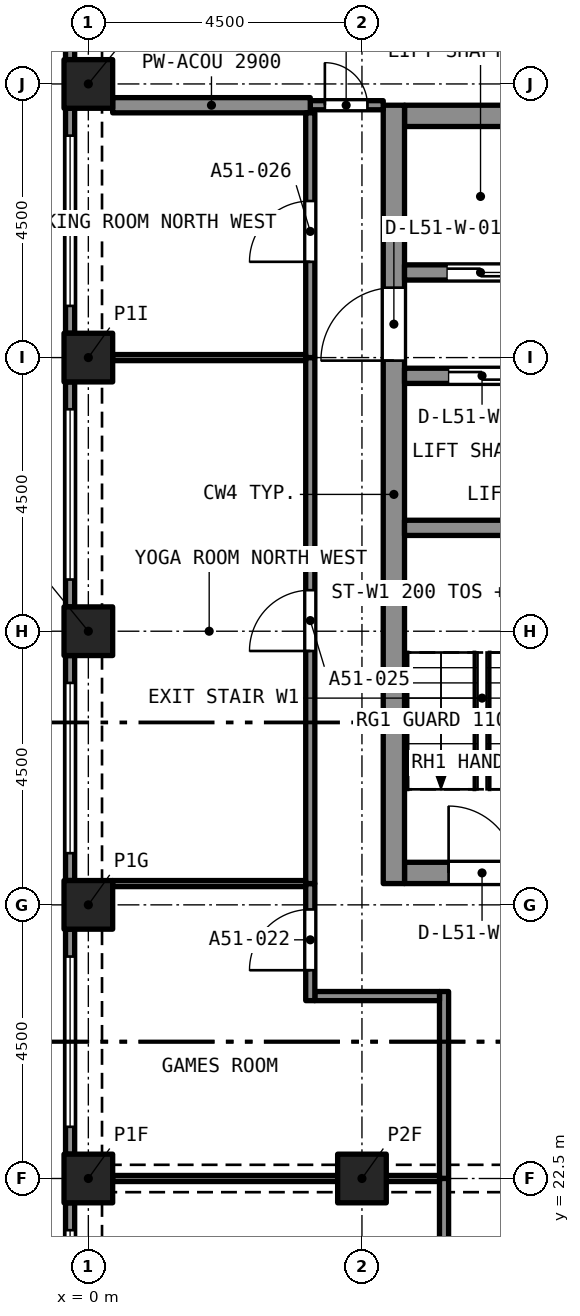
"""IFC4 building model, lengths in metres.
Left out: names, types, materials, properties, quantities, classifications, styles, units other than length and angle.
Written with IfcOpenShell. Run it as: python <this file> out.ifc"""

import sys

from ifc_helpers import new_model, si_unit, direction, frame, frame_2d, origin, origin_2d, place, context, subcontext, project, spatial, rectangle, extrude, element, fill, save


model = new_model("IFC4")
c1 = context("Model", 3, precision=1e-05, world=origin(), true_north=direction((0.0, 1.0)))
c2 = subcontext(c1, "Body", "Model", "MODEL_VIEW")
j1 = project(units=[si_unit("LENGTHUNIT", "METRE"), si_unit("PLANEANGLEUNIT", "RADIAN")], contexts=[c1])
p1 = place(None, origin())
s1 = spatial("IfcSite", under=j1, at=p1, CompositionType="ELEMENT")
p2 = place(p1, origin())
s2 = spatial("IfcBuilding", under=s1, at=p2, CompositionType="ELEMENT")
p3 = place(p2, frame((0.0, 0.0, 185.9)))
s3 = spatial("IfcBuildingStorey", under=s2, at=p3, CompositionType="ELEMENT", Elevation=185.9)
for number, where, z_axis, x_axis in (
    (1, (0.0, 22.5, 0.0), (0.0, 0.0, 1.0), (1.0, 0.0, 0.0)),
    (2, (4.5, 22.5, 0.0), (0.0, 0.0, 1.0), (1.0, 0.0, 0.0)),
    (3, (0.0, 27.0, 0.0), (0.0, 0.0, 1.0), (1.0, 0.0, 0.0)),
    (4, (0.0, 31.5, 0.0), (0.0, 0.0, 1.0), (1.0, 0.0, 0.0)),
    (5, (0.0, 36.0, 0.0), (0.0, 0.0, 1.0), (1.0, 0.0, 0.0)),
    (6, (0.0, 40.5, 0.0), (0.0, 0.0, 1.0), (1.0, 0.0, 0.0)),
):
    element("IfcColumn", number, at=place(p3, frame(where, z_axis=z_axis, x_axis=x_axis)), inside=s3, PredefinedType="COLUMN", context=c2, shape_type="SweptSolid", body=[
        extrude(rectangle(XDim=0.8, YDim=0.8, at=origin_2d()), origin(), (0.0, 0.0, 1.0), 3.2),
    ])
p4 = place(p3, frame((5.2, 27.525, 0.0), z_axis=(0.0, 0.0, 1.0), x_axis=(1.0, 0.0, 0.0)))
e7 = element("IfcWall", 7, at=p4, inside=s3, PredefinedType="SOLIDWALL", context=c2, shape_type="SweptSolid", body=[
    extrude(rectangle(XDim=7.6, YDim=0.35, at=frame_2d((3.8, 0.0))), origin(), (0.0, 0.0, 1.0), 3.2),
])
p5 = place(p4, frame((0.725, 0.0, 0.0)))
e8 = element("IfcOpeningElement", 8, at=p5, cuts=e7, PredefinedType="OPENING", context=c2, shape_type="SweptSolid", body=[
    extrude(rectangle(XDim=1.1, YDim=2.1, at=frame_2d((0.55, 1.05))), frame((0.0, 0.185, 0.0), z_axis=(0.0, -1.0, 0.0), x_axis=(1.0, 0.0, 0.0)), (0.0, 0.0, 1.0), 0.37),
])
p6 = place(p4, frame((3.25, 0.0, 0.0)))
e9 = element("IfcOpeningElement", 9, at=p6, cuts=e7, PredefinedType="OPENING", context=c2, shape_type="SweptSolid", body=[
    extrude(rectangle(XDim=1.1, YDim=2.1, at=frame_2d((0.55, 1.05))), frame((0.0, 0.185, 0.0), z_axis=(0.0, -1.0, 0.0), x_axis=(1.0, 0.0, 0.0)), (0.0, 0.0, 1.0), 0.37),
])
p7 = place(p4, frame((5.775, 0.0, 0.0)))
e10 = element("IfcOpeningElement", 10, at=p7, cuts=e7, PredefinedType="OPENING", context=c2, shape_type="SweptSolid", body=[
    extrude(rectangle(XDim=1.1, YDim=2.1, at=frame_2d((0.55, 1.05))), frame((0.0, 0.185, 0.0), z_axis=(0.0, -1.0, 0.0), x_axis=(1.0, 0.0, 0.0)), (0.0, 0.0, 1.0), 0.37),
])
p8 = place(p3, frame((5.2, 39.975, 0.0), z_axis=(0.0, 0.0, 1.0), x_axis=(1.0, 0.0, 0.0)))
e11 = element("IfcWall", 11, at=p8, inside=s3, PredefinedType="SOLIDWALL", context=c2, shape_type="SweptSolid", body=[
    extrude(rectangle(XDim=7.6, YDim=0.35, at=frame_2d((3.8, 0.0))), origin(), (0.0, 0.0, 1.0), 3.2),
])
p9 = place(p3, frame((5.025, 27.35, 0.0), z_axis=(0.0, 0.0, 1.0), x_axis=(0.0, 1.0, 0.0)))
e12 = element("IfcWall", 12, at=p9, inside=s3, PredefinedType="SOLIDWALL", context=c2, shape_type="SweptSolid", body=[
    extrude(rectangle(XDim=12.8, YDim=0.35, at=frame_2d((6.4, 0.0))), origin(), (0.0, 0.0, 1.0), 3.2),
])
p10 = place(p9, frame((8.6, 0.0, 0.0)))
e13 = element("IfcOpeningElement", 13, at=p10, cuts=e12, PredefinedType="OPENING", context=c2, shape_type="SweptSolid", body=[
    extrude(rectangle(XDim=1.2, YDim=2.1, at=frame_2d((0.6, 1.05))), frame((0.0, 0.185, 0.0), z_axis=(0.0, -1.0, 0.0), x_axis=(1.0, 0.0, 0.0)), (0.0, 0.0, 1.0), 0.37),
])
p11 = place(p3, frame((-0.3, 40.9, 0.0), z_axis=(0.0, 0.0, 1.0), x_axis=(0.0, 1.0, 0.0)))
e14 = element("IfcWall", 14, at=p11, inside=s3, PredefinedType="SOLIDWALL", context=c2, shape_type="SweptSolid", body=[
    extrude(rectangle(XDim=3.7, YDim=0.15, at=frame_2d((1.85, 0.0))), origin(), (0.0, 0.0, 1.0), 3.2),
])
p12 = place(p11, frame((0.45, 0.0, 0.45)))
e15 = element("IfcOpeningElement", 15, at=p12, cuts=e14, PredefinedType="OPENING", context=c2, shape_type="SweptSolid", body=[
    extrude(rectangle(XDim=2.8, YDim=1.95, at=frame_2d((1.4, 0.975))), frame((0.0, 0.085, 0.0), z_axis=(0.0, -1.0, 0.0), x_axis=(1.0, 0.0, 0.0)), (0.0, 0.0, 1.0), 0.17),
])
p13 = place(p3, frame((-0.3, 36.4, 0.0), z_axis=(0.0, 0.0, 1.0), x_axis=(0.0, 1.0, 0.0)))
e16 = element("IfcWall", 16, at=p13, inside=s3, PredefinedType="SOLIDWALL", context=c2, shape_type="SweptSolid", body=[
    extrude(rectangle(XDim=3.7, YDim=0.15, at=frame_2d((1.85, 0.0))), origin(), (0.0, 0.0, 1.0), 3.2),
])
p14 = place(p13, frame((0.45, 0.0, 0.45)))
e17 = element("IfcOpeningElement", 17, at=p14, cuts=e16, PredefinedType="OPENING", context=c2, shape_type="SweptSolid", body=[
    extrude(rectangle(XDim=2.8, YDim=1.95, at=frame_2d((1.4, 0.975))), frame((0.0, 0.085, 0.0), z_axis=(0.0, -1.0, 0.0), x_axis=(1.0, 0.0, 0.0)), (0.0, 0.0, 1.0), 0.17),
])
p15 = place(p3, frame((-0.3, 31.9, 0.0), z_axis=(0.0, 0.0, 1.0), x_axis=(0.0, 1.0, 0.0)))
e18 = element("IfcWall", 18, at=p15, inside=s3, PredefinedType="SOLIDWALL", context=c2, shape_type="SweptSolid", body=[
    extrude(rectangle(XDim=3.7, YDim=0.15, at=frame_2d((1.85, 0.0))), origin(), (0.0, 0.0, 1.0), 3.2),
])
p16 = place(p15, frame((0.45, 0.0, 0.45)))
e19 = element("IfcOpeningElement", 19, at=p16, cuts=e18, PredefinedType="OPENING", context=c2, shape_type="SweptSolid", body=[
    extrude(rectangle(XDim=2.8, YDim=1.95, at=frame_2d((1.4, 0.975))), frame((0.0, 0.085, 0.0), z_axis=(0.0, -1.0, 0.0), x_axis=(1.0, 0.0, 0.0)), (0.0, 0.0, 1.0), 0.17),
])
p17 = place(p3, frame((-0.3, 27.4, 0.0), z_axis=(0.0, 0.0, 1.0), x_axis=(0.0, 1.0, 0.0)))
e20 = element("IfcWall", 20, at=p17, inside=s3, PredefinedType="SOLIDWALL", context=c2, shape_type="SweptSolid", body=[
    extrude(rectangle(XDim=3.7, YDim=0.15, at=frame_2d((1.85, 0.0))), origin(), (0.0, 0.0, 1.0), 3.2),
])
p18 = place(p17, frame((0.45, 0.0, 0.45)))
e21 = element("IfcOpeningElement", 21, at=p18, cuts=e20, PredefinedType="OPENING", context=c2, shape_type="SweptSolid", body=[
    extrude(rectangle(XDim=2.8, YDim=1.95, at=frame_2d((1.4, 0.975))), frame((0.0, 0.085, 0.0), z_axis=(0.0, -1.0, 0.0), x_axis=(1.0, 0.0, 0.0)), (0.0, 0.0, 1.0), 0.17),
])
p19 = place(p3, frame((-0.3, 22.9, 0.0), z_axis=(0.0, 0.0, 1.0), x_axis=(0.0, 1.0, 0.0)))
e22 = element("IfcWall", 22, at=p19, inside=s3, PredefinedType="SOLIDWALL", context=c2, shape_type="SweptSolid", body=[
    extrude(rectangle(XDim=3.7, YDim=0.15, at=frame_2d((1.85, 0.0))), origin(), (0.0, 0.0, 1.0), 3.2),
])
p20 = place(p19, frame((0.45, 0.0, 0.45)))
e23 = element("IfcOpeningElement", 23, at=p20, cuts=e22, PredefinedType="OPENING", context=c2, shape_type="SweptSolid", body=[
    extrude(rectangle(XDim=2.8, YDim=1.95, at=frame_2d((1.4, 0.975))), frame((0.0, 0.085, 0.0), z_axis=(0.0, -1.0, 0.0), x_axis=(1.0, 0.0, 0.0)), (0.0, 0.0, 1.0), 0.17),
])
p21 = place(p3, frame((-0.3, 18.4, 0.0), z_axis=(0.0, 0.0, 1.0), x_axis=(0.0, 1.0, 0.0)))
e24 = element("IfcWall", 24, at=p21, inside=s3, PredefinedType="SOLIDWALL", context=c2, shape_type="SweptSolid", body=[
    extrude(rectangle(XDim=3.7, YDim=0.15, at=frame_2d((1.85, 0.0))), origin(), (0.0, 0.0, 1.0), 3.2),
])
p22 = place(p21, frame((0.45, 0.0, 0.45)))
e25 = element("IfcOpeningElement", 25, at=p22, cuts=e24, PredefinedType="OPENING", context=c2, shape_type="SweptSolid", body=[
    extrude(rectangle(XDim=2.8, YDim=1.95, at=frame_2d((1.4, 0.975))), frame((0.0, 0.085, 0.0), z_axis=(0.0, -1.0, 0.0), x_axis=(1.0, 0.0, 0.0)), (0.0, 0.0, 1.0), 0.17),
])
p23 = place(p3, frame((3.65, 40.15, 0.0), z_axis=(0.0, 0.0, 1.0), x_axis=(1.0, 0.0, 0.0)))
e26 = element("IfcWall", 26, at=p23, inside=s3, PredefinedType="PARTITIONING", context=c2, shape_type="SweptSolid", body=[
    extrude(rectangle(XDim=1.2, YDim=0.15, at=frame_2d((0.6, 0.0))), origin(), (0.0, 0.0, 1.0), 2.9),
])
p24 = place(p23, frame((0.24, 0.0, 0.0)))
e27 = element("IfcOpeningElement", 27, at=p24, cuts=e26, PredefinedType="OPENING", context=c2, shape_type="SweptSolid", body=[
    extrude(rectangle(XDim=0.7, YDim=2.1, at=frame_2d((0.35, 1.05))), frame((0.0, 0.085, 0.0), z_axis=(0.0, -1.0, 0.0), x_axis=(1.0, 0.0, 0.0)), (0.0, 0.0, 1.0), 0.17),
])
p25 = place(p3, frame((0.4, 40.15, 0.0), z_axis=(0.0, 0.0, 1.0), x_axis=(1.0, 0.0, 0.0)))
e28 = element("IfcWall", 28, at=p25, inside=s3, PredefinedType="PARTITIONING", context=c2, shape_type="SweptSolid", body=[
    extrude(rectangle(XDim=3.25, YDim=0.25, at=frame_2d((1.625, 0.0))), origin(), (0.0, 0.0, 1.0), 2.9),
])
p26 = place(p3, frame((5.85, 22.5, 0.0), z_axis=(0.0, 0.0, 1.0), x_axis=(0.0, 1.0, 0.0)))
e29 = element("IfcWall", 29, at=p26, inside=s3, PredefinedType="PARTITIONING", context=c2, shape_type="SweptSolid", body=[
    extrude(rectangle(XDim=3.075, YDim=0.15, at=frame_2d((1.538, 0.0))), origin(), (0.0, 0.0, 1.0), 2.9),
])
p27 = place(p3, frame((3.725, 25.5, 0.0), z_axis=(0.0, 0.0, 1.0), x_axis=(1.0, 0.0, 0.0)))
e30 = element("IfcWall", 30, at=p27, inside=s3, PredefinedType="PARTITIONING", context=c2, shape_type="SweptSolid", body=[
    extrude(rectangle(XDim=2.05, YDim=0.15, at=frame_2d((1.025, 0.0))), origin(), (0.0, 0.0, 1.0), 2.9),
])
p28 = place(p3, frame((3.65, 25.425, 0.0), z_axis=(0.0, 0.0, 1.0), x_axis=(0.0, 1.0, 0.0)))
e31 = element("IfcWall", 31, at=p28, inside=s3, PredefinedType="PARTITIONING", context=c2, shape_type="SweptSolid", body=[
    extrude(rectangle(XDim=1.925, YDim=0.15, at=frame_2d((0.962, 0.0))), origin(), (0.0, 0.0, 1.0), 2.9),
])
p29 = place(p28, frame((0.5, 0.0, 0.0)))
e32 = element("IfcOpeningElement", 32, at=p29, cuts=e31, PredefinedType="OPENING", context=c2, shape_type="SweptSolid", body=[
    extrude(rectangle(XDim=1.0, YDim=2.1, at=frame_2d((0.5, 1.05))), frame((0.0, 0.085, 0.0), z_axis=(0.0, -1.0, 0.0), x_axis=(1.0, 0.0, 0.0)), (0.0, 0.0, 1.0), 0.17),
])
p30 = place(p3, frame((3.65, 27.35, 0.0), z_axis=(0.0, 0.0, 1.0), x_axis=(0.0, 1.0, 0.0)))
e33 = element("IfcWall", 33, at=p30, inside=s3, PredefinedType="PARTITIONING", context=c2, shape_type="SweptSolid", body=[
    extrude(rectangle(XDim=8.65, YDim=0.15, at=frame_2d((4.325, 0.0))), origin(), (0.0, 0.0, 1.0), 2.9),
])
p31 = place(p30, frame((3.825, 0.0, 0.0)))
e34 = element("IfcOpeningElement", 34, at=p31, cuts=e33, PredefinedType="OPENING", context=c2, shape_type="SweptSolid", body=[
    extrude(rectangle(XDim=1.0, YDim=2.1, at=frame_2d((0.5, 1.05))), frame((0.0, 0.085, 0.0), z_axis=(0.0, -1.0, 0.0), x_axis=(1.0, 0.0, 0.0)), (0.0, 0.0, 1.0), 0.17),
])
p32 = place(p3, frame((3.65, 36.0, 0.0), z_axis=(0.0, 0.0, 1.0), x_axis=(0.0, 1.0, 0.0)))
e35 = element("IfcWall", 35, at=p32, inside=s3, PredefinedType="PARTITIONING", context=c2, shape_type="SweptSolid", body=[
    extrude(rectangle(XDim=4.025, YDim=0.15, at=frame_2d((2.012, 0.0))), origin(), (0.0, 0.0, 1.0), 2.9),
])
p33 = place(p32, frame((1.575, 0.0, 0.0)))
e36 = element("IfcOpeningElement", 36, at=p33, cuts=e35, PredefinedType="OPENING", context=c2, shape_type="SweptSolid", body=[
    extrude(rectangle(XDim=1.0, YDim=2.1, at=frame_2d((0.5, 1.05))), frame((0.0, 0.085, 0.0), z_axis=(0.0, -1.0, 0.0), x_axis=(1.0, 0.0, 0.0)), (0.0, 0.0, 1.0), 0.17),
])
p34 = place(p3, frame((5.85, 13.025, 0.0), z_axis=(0.0, 0.0, 1.0), x_axis=(0.0, 1.0, 0.0)))
e37 = element("IfcWall", 37, at=p34, inside=s3, PredefinedType="PARTITIONING", context=c2, shape_type="SweptSolid", body=[
    extrude(rectangle(XDim=9.475, YDim=0.15, at=frame_2d((4.738, 0.0))), origin(), (0.0, 0.0, 1.0), 2.9),
])
p35 = place(p34, frame((4.275, 0.0, 0.0)))
e38 = element("IfcOpeningElement", 38, at=p35, cuts=e37, PredefinedType="OPENING", context=c2, shape_type="SweptSolid", body=[
    extrude(rectangle(XDim=1.0, YDim=2.1, at=frame_2d((0.5, 1.05))), frame((0.0, 0.085, 0.0), z_axis=(0.0, -1.0, 0.0), x_axis=(1.0, 0.0, 0.0)), (0.0, 0.0, 1.0), 0.17),
])
p36 = place(p3, frame((0.4, 27.35, 0.0), z_axis=(0.0, 0.0, 1.0), x_axis=(1.0, 0.0, 0.0)))
e39 = element("IfcWall", 39, at=p36, inside=s3, PredefinedType="PARTITIONING", context=c2, shape_type="SweptSolid", body=[
    extrude(rectangle(XDim=3.175, YDim=0.1, at=frame_2d((1.587, 0.0))), origin(), (0.0, 0.0, 1.0), 2.9),
])
p37 = place(p3, frame((4.9, 22.5, 0.0), z_axis=(0.0, 0.0, 1.0), x_axis=(1.0, 0.0, 0.0)))
e40 = element("IfcWall", 40, at=p37, inside=s3, PredefinedType="PARTITIONING", context=c2, shape_type="SweptSolid", body=[
    extrude(rectangle(XDim=0.875, YDim=0.1, at=frame_2d((0.438, 0.0))), origin(), (0.0, 0.0, 1.0), 2.38),
])
p38 = place(p3, frame((0.4, 22.5, 0.0), z_axis=(0.0, 0.0, 1.0), x_axis=(1.0, 0.0, 0.0)))
e41 = element("IfcWall", 41, at=p38, inside=s3, PredefinedType="PARTITIONING", context=c2, shape_type="SweptSolid", body=[
    extrude(rectangle(XDim=3.7, YDim=0.1, at=frame_2d((1.85, 0.0))), origin(), (0.0, 0.0, 1.0), 2.38),
])
p39 = place(p3, frame((0.4, 36.0, 0.0), z_axis=(0.0, 0.0, 1.0), x_axis=(1.0, 0.0, 0.0)))
e42 = element("IfcWall", 42, at=p39, inside=s3, PredefinedType="PARTITIONING", context=c2, shape_type="SweptSolid", body=[
    extrude(rectangle(XDim=3.175, YDim=0.1, at=frame_2d((1.587, 0.0))), origin(), (0.0, 0.0, 1.0), 2.9),
])
p40 = place(p3, frame((5.2, 33.2, 0.0), z_axis=(0.0, 0.0, 1.0), x_axis=(1.0, 0.0, 0.0)))
e43 = element("IfcWall", 43, at=p40, inside=s3, PredefinedType="SOLIDWALL", context=c2, shape_type="SweptSolid", body=[
    extrude(rectangle(XDim=7.6, YDim=0.25, at=frame_2d((3.8, 0.0))), origin(), (0.0, 0.0, 1.0), 2.9),
])
p41 = place(p40, frame((3.3, 0.0, 0.0)))
e44 = element("IfcOpeningElement", 44, at=p41, cuts=e43, PredefinedType="OPENING", context=c2, shape_type="SweptSolid", body=[
    extrude(rectangle(XDim=1.0, YDim=2.1, at=frame_2d((0.5, 1.05))), frame((0.0, 0.135, 0.0), z_axis=(0.0, -1.0, 0.0), x_axis=(1.0, 0.0, 0.0)), (0.0, 0.0, 1.0), 0.27),
])
p42 = place(p3, frame((5.2, 35.7, 0.0), z_axis=(0.0, 0.0, 1.0), x_axis=(1.0, 0.0, 0.0)))
e45 = element("IfcWall", 45, at=p42, inside=s3, PredefinedType="SOLIDWALL", context=c2, shape_type="SweptSolid", body=[
    extrude(rectangle(XDim=7.6, YDim=0.25, at=frame_2d((3.8, 0.0))), origin(), (0.0, 0.0, 1.0), 2.9),
])
p43 = place(p42, frame((0.725, 0.0, 0.0)))
e46 = element("IfcOpeningElement", 46, at=p43, cuts=e45, PredefinedType="OPENING", context=c2, shape_type="SweptSolid", body=[
    extrude(rectangle(XDim=1.1, YDim=2.4, at=frame_2d((0.55, 1.2))), frame((0.0, 0.135, 0.0), z_axis=(0.0, -1.0, 0.0), x_axis=(1.0, 0.0, 0.0)), (0.0, 0.0, 1.0), 0.27),
])
p44 = place(p42, frame((5.125, 0.0, 0.0)))
e47 = element("IfcOpeningElement", 47, at=p44, cuts=e45, PredefinedType="OPENING", context=c2, shape_type="SweptSolid", body=[
    extrude(rectangle(XDim=0.8, YDim=2.1, at=frame_2d((0.4, 1.05))), frame((0.0, 0.135, 0.0), z_axis=(0.0, -1.0, 0.0), x_axis=(1.0, 0.0, 0.0)), (0.0, 0.0, 1.0), 0.27),
])
p45 = place(p42, frame((6.45, 0.0, 0.0)))
e48 = element("IfcOpeningElement", 48, at=p45, cuts=e45, PredefinedType="OPENING", context=c2, shape_type="SweptSolid", body=[
    extrude(rectangle(XDim=0.9, YDim=2.1, at=frame_2d((0.45, 1.05))), frame((0.0, 0.135, 0.0), z_axis=(0.0, -1.0, 0.0), x_axis=(1.0, 0.0, 0.0)), (0.0, 0.0, 1.0), 0.27),
])
p46 = place(p3, frame((5.2, 37.4, 0.0), z_axis=(0.0, 0.0, 1.0), x_axis=(1.0, 0.0, 0.0)))
e49 = element("IfcWall", 49, at=p46, inside=s3, PredefinedType="SOLIDWALL", context=c2, shape_type="SweptSolid", body=[
    extrude(rectangle(XDim=7.6, YDim=0.25, at=frame_2d((3.8, 0.0))), origin(), (0.0, 0.0, 1.0), 2.9),
])
p47 = place(p46, frame((0.7, 0.0, 0.0)))
e50 = element("IfcOpeningElement", 50, at=p47, cuts=e49, PredefinedType="OPENING", context=c2, shape_type="SweptSolid", body=[
    extrude(rectangle(XDim=1.1, YDim=2.4, at=frame_2d((0.55, 1.2))), frame((0.0, 0.135, 0.0), z_axis=(0.0, -1.0, 0.0), x_axis=(1.0, 0.0, 0.0)), (0.0, 0.0, 1.0), 0.27),
])
p48 = place(p14, origin())
e51 = element("IfcWindow", 51, at=p48, inside=s3, PartitioningType="SINGLE_PANEL", PredefinedType="WINDOW", context=c2, shape_type="SweptSolid", body=[
    extrude(rectangle(XDim=2.8, YDim=1.95, at=frame_2d((1.4, 0.975))), frame((0.0, 0.03, 0.0), z_axis=(0.0, -1.0, 0.0), x_axis=(1.0, 0.0, 0.0)), (0.0, 0.0, 1.0), 0.06),
])
fill(e17, e51)
p49 = place(p16, origin())
e52 = element("IfcWindow", 52, at=p49, inside=s3, PartitioningType="SINGLE_PANEL", PredefinedType="WINDOW", context=c2, shape_type="SweptSolid", body=[
    extrude(rectangle(XDim=2.8, YDim=1.95, at=frame_2d((1.4, 0.975))), frame((0.0, 0.03, 0.0), z_axis=(0.0, -1.0, 0.0), x_axis=(1.0, 0.0, 0.0)), (0.0, 0.0, 1.0), 0.06),
])
fill(e19, e52)
p50 = place(p18, origin())
e53 = element("IfcWindow", 53, at=p50, inside=s3, PartitioningType="SINGLE_PANEL", PredefinedType="WINDOW", context=c2, shape_type="SweptSolid", body=[
    extrude(rectangle(XDim=2.8, YDim=1.95, at=frame_2d((1.4, 0.975))), frame((0.0, 0.03, 0.0), z_axis=(0.0, -1.0, 0.0), x_axis=(1.0, 0.0, 0.0)), (0.0, 0.0, 1.0), 0.06),
])
fill(e21, e53)
p51 = place(p20, origin())
e54 = element("IfcWindow", 54, at=p51, inside=s3, PartitioningType="SINGLE_PANEL", PredefinedType="WINDOW", context=c2, shape_type="SweptSolid", body=[
    extrude(rectangle(XDim=2.8, YDim=1.95, at=frame_2d((1.4, 0.975))), frame((0.0, 0.03, 0.0), z_axis=(0.0, -1.0, 0.0), x_axis=(1.0, 0.0, 0.0)), (0.0, 0.0, 1.0), 0.06),
])
fill(e23, e54)
p52 = place(p22, origin())
e55 = element("IfcWindow", 55, at=p52, inside=s3, PartitioningType="SINGLE_PANEL", PredefinedType="WINDOW", context=c2, shape_type="SweptSolid", body=[
    extrude(rectangle(XDim=2.8, YDim=1.95, at=frame_2d((1.4, 0.975))), frame((0.0, 0.03, 0.0), z_axis=(0.0, -1.0, 0.0), x_axis=(1.0, 0.0, 0.0)), (0.0, 0.0, 1.0), 0.06),
])
fill(e25, e55)
p53 = place(p24, origin())
e56 = element("IfcDoor", 56, at=p53, inside=s3, OperationType="SINGLE_SWING_LEFT", PredefinedType="DOOR", context=c2, shape_type="SweptSolid", body=[
    extrude(rectangle(XDim=0.7, YDim=2.1, at=frame_2d((0.35, 1.05))), frame((0.0, 0.025, 0.0), z_axis=(0.0, -1.0, 0.0), x_axis=(1.0, 0.0, 0.0)), (0.0, 0.0, 1.0), 0.05),
])
fill(e27, e56)
p54 = place(p29, origin())
e57 = element("IfcDoor", 57, at=p54, inside=s3, OperationType="SINGLE_SWING_RIGHT", PredefinedType="DOOR", context=c2, shape_type="SweptSolid", body=[
    extrude(rectangle(XDim=1.0, YDim=2.1, at=frame_2d((0.5, 1.05))), frame((0.0, 0.025, 0.0), z_axis=(0.0, -1.0, 0.0), x_axis=(1.0, 0.0, 0.0)), (0.0, 0.0, 1.0), 0.05),
])
fill(e32, e57)
p55 = place(p31, origin())
e58 = element("IfcDoor", 58, at=p55, inside=s3, OperationType="SINGLE_SWING_RIGHT", PredefinedType="DOOR", context=c2, shape_type="SweptSolid", body=[
    extrude(rectangle(XDim=1.0, YDim=2.1, at=frame_2d((0.5, 1.05))), frame((0.0, 0.025, 0.0), z_axis=(0.0, -1.0, 0.0), x_axis=(1.0, 0.0, 0.0)), (0.0, 0.0, 1.0), 0.05),
])
fill(e34, e58)
p56 = place(p33, origin())
e59 = element("IfcDoor", 59, at=p56, inside=s3, OperationType="SINGLE_SWING_RIGHT", PredefinedType="DOOR", context=c2, shape_type="SweptSolid", body=[
    extrude(rectangle(XDim=1.0, YDim=2.1, at=frame_2d((0.5, 1.05))), frame((0.0, 0.025, 0.0), z_axis=(0.0, -1.0, 0.0), x_axis=(1.0, 0.0, 0.0)), (0.0, 0.0, 1.0), 0.05),
])
fill(e36, e59)
p57 = place(p47, origin())
e60 = element("IfcDoor", 60, at=p57, inside=s3, OperationType="SLIDING_TO_LEFT", PredefinedType="DOOR", context=c2, shape_type="SweptSolid", body=[
    extrude(rectangle(XDim=1.1, YDim=2.4, at=frame_2d((0.55, 1.2))), frame((0.0, 0.025, 0.0), z_axis=(0.0, -1.0, 0.0), x_axis=(1.0, 0.0, 0.0)), (0.0, 0.0, 1.0), 0.05),
])
fill(e50, e60)
p58 = place(p43, origin())
e61 = element("IfcDoor", 61, at=p58, inside=s3, OperationType="SLIDING_TO_LEFT", PredefinedType="DOOR", context=c2, shape_type="SweptSolid", body=[
    extrude(rectangle(XDim=1.1, YDim=2.4, at=frame_2d((0.55, 1.2))), frame((0.0, 0.025, 0.0), z_axis=(0.0, -1.0, 0.0), x_axis=(1.0, 0.0, 0.0)), (0.0, 0.0, 1.0), 0.05),
])
fill(e46, e61)
p59 = place(p5, origin())
e62 = element("IfcDoor", 62, at=p59, inside=s3, OperationType="SINGLE_SWING_LEFT", PredefinedType="DOOR", context=c2, shape_type="SweptSolid", body=[
    extrude(rectangle(XDim=1.1, YDim=2.1, at=frame_2d((0.55, 1.05))), frame((0.0, 0.025, 0.0), z_axis=(0.0, -1.0, 0.0), x_axis=(1.0, 0.0, 0.0)), (0.0, 0.0, 1.0), 0.05),
])
fill(e8, e62)
p60 = place(p10, origin())
e63 = element("IfcDoor", 63, at=p60, inside=s3, OperationType="SINGLE_SWING_LEFT", PredefinedType="DOOR", context=c2, shape_type="SweptSolid", body=[
    extrude(rectangle(XDim=1.2, YDim=2.1, at=frame_2d((0.6, 1.05))), frame((0.0, 0.025, 0.0), z_axis=(0.0, -1.0, 0.0), x_axis=(1.0, 0.0, 0.0)), (0.0, 0.0, 1.0), 0.05),
])
fill(e13, e63)
save(model, sys.argv[1])
